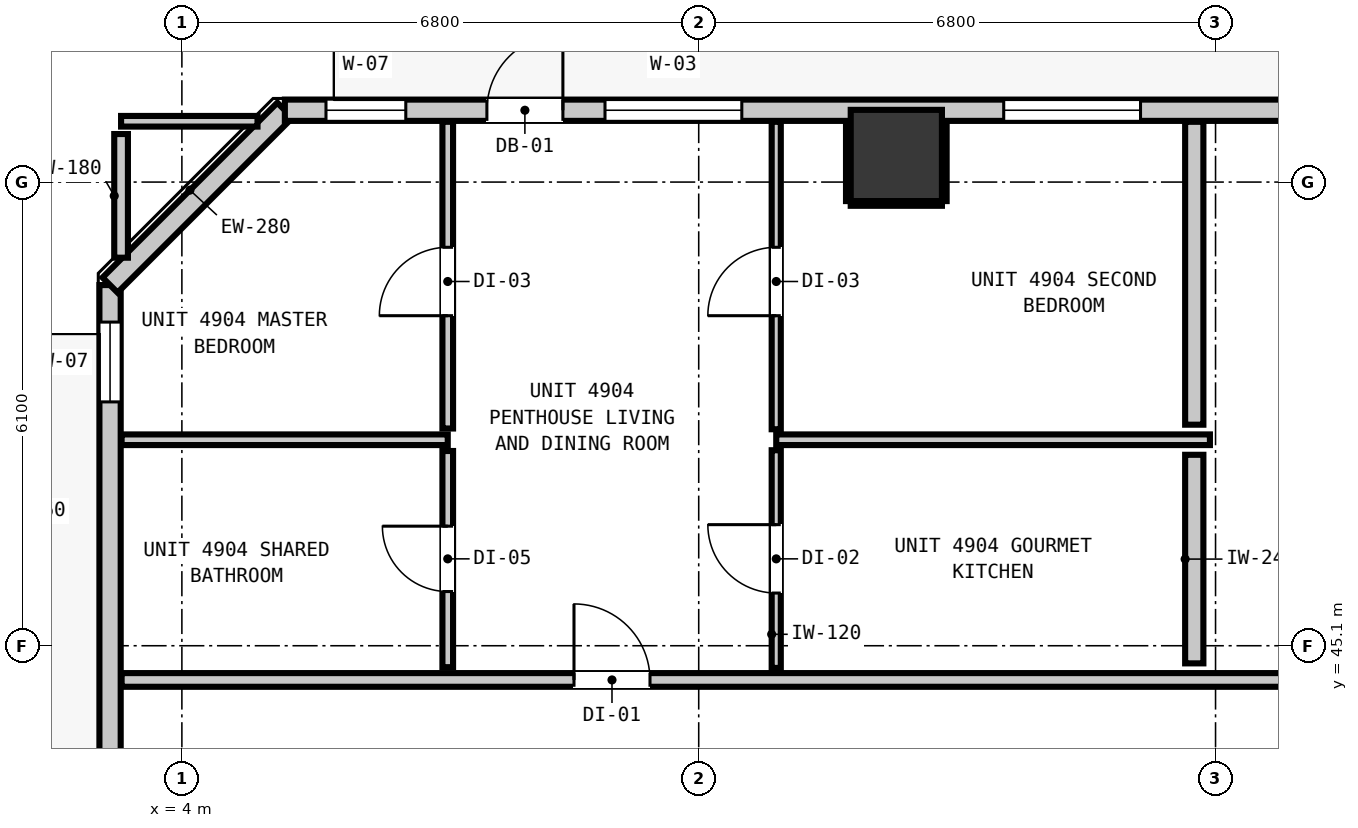
"""IFC4 building model, lengths in metres.
Left out: names, types, materials, properties, quantities, classifications, styles, units other than length and angle.
Written with IfcOpenShell. Run it as: python <this file> out.ifc"""

import sys

from ifc_helpers import new_model, si_unit, direction, frame, frame_2d, origin, origin_2d, place, context, subcontext, project, spatial, rectangle, extrude, element, fill, save


model = new_model("IFC4")
c1 = context("Model", 3, precision=1e-05, world=origin(), true_north=direction((0.0, 1.0)))
c2 = subcontext(c1, "Body", "Model", "MODEL_VIEW")
j1 = project(units=[si_unit("LENGTHUNIT", "METRE"), si_unit("PLANEANGLEUNIT", "RADIAN")], contexts=[c1])
p1 = place(None, origin())
s1 = spatial("IfcSite", under=j1, at=p1, CompositionType="ELEMENT")
p2 = place(p1, origin())
s2 = spatial("IfcBuilding", under=s1, at=p2, CompositionType="ELEMENT")
p3 = place(p2, frame((0.0, 0.0, 169.16)))
s3 = spatial("IfcBuildingStorey", under=s2, at=p3, CompositionType="ELEMENT", Elevation=169.16)
p4 = place(p3, frame((13.4, 51.55, 0.0), z_axis=(0.0, 0.0, 1.0), x_axis=(1.0, 0.0, 0.0)))
e1 = element("IfcColumn", 1, at=p4, inside=s3, PredefinedType="COLUMN", context=c2, shape_type="SweptSolid", body=[
    extrude(rectangle(XDim=1.2, YDim=1.2, at=origin_2d()), origin(), (0.0, 0.0, 1.0), 3.32),
])
p5 = place(p3, frame((3.055, 17.555, 0.0), z_axis=(0.0, 0.0, 1.0), x_axis=(0.0, 1.0, 0.0)))
e2 = element("IfcWall", 2, at=p5, inside=s3, PredefinedType="STANDARD", context=c2, shape_type="SweptSolid", body=[
    extrude(rectangle(XDim=32.29, YDim=0.28, at=frame_2d((16.145, 0.0))), origin(), (0.0, 0.0, 1.0), 2.96),
])
p6 = place(p5, frame((6.871, 0.0, 0.0)))
e3 = element("IfcOpeningElement", 3, at=p6, cuts=e2, PredefinedType="OPENING", context=c2, shape_type="SweptSolid", body=[
    extrude(rectangle(XDim=1.0, YDim=2.15, at=frame_2d((0.5, 1.075))), frame((0.0, 0.15, 0.0), z_axis=(0.0, -1.0, 0.0), x_axis=(1.0, 0.0, 0.0)), (0.0, 0.0, 1.0), 0.3),
])
p7 = place(p5, frame((30.753, 0.0, 0.85)))
e4 = element("IfcOpeningElement", 4, at=p7, cuts=e2, PredefinedType="OPENING", context=c2, shape_type="SweptSolid", body=[
    extrude(rectangle(XDim=1.05, YDim=1.65, at=frame_2d((0.525, 0.825))), frame((0.0, 0.15, 0.0), z_axis=(0.0, -1.0, 0.0), x_axis=(1.0, 0.0, 0.0)), (0.0, 0.0, 1.0), 0.3),
])
p8 = place(p5, frame((8.6, 0.0, 0.85)))
e5 = element("IfcOpeningElement", 5, at=p8, cuts=e2, PredefinedType="OPENING", context=c2, shape_type="SweptSolid", body=[
    extrude(rectangle(XDim=1.05, YDim=1.65, at=frame_2d((0.525, 0.825))), frame((0.0, 0.15, 0.0), z_axis=(0.0, -1.0, 0.0), x_axis=(1.0, 0.0, 0.0)), (0.0, 0.0, 1.0), 0.3),
])
p9 = place(p5, frame((10.612, 0.0, 0.85)))
e6 = element("IfcOpeningElement", 6, at=p9, cuts=e2, PredefinedType="OPENING", context=c2, shape_type="SweptSolid", body=[
    extrude(rectangle(XDim=1.8, YDim=1.9, at=frame_2d((0.9, 0.95))), frame((0.0, 0.15, 0.0), z_axis=(0.0, -1.0, 0.0), x_axis=(1.0, 0.0, 0.0)), (0.0, 0.0, 1.0), 0.3),
])
p10 = place(p5, frame((16.925, 0.0, 0.85)))
e7 = element("IfcOpeningElement", 7, at=p10, cuts=e2, PredefinedType="OPENING", context=c2, shape_type="SweptSolid", body=[
    extrude(rectangle(XDim=1.8, YDim=1.9, at=frame_2d((0.9, 0.95))), frame((0.0, 0.15, 0.0), z_axis=(0.0, -1.0, 0.0), x_axis=(1.0, 0.0, 0.0)), (0.0, 0.0, 1.0), 0.3),
])
p11 = place(p5, frame((20.113, 0.0, 0.85)))
e8 = element("IfcOpeningElement", 8, at=p11, cuts=e2, PredefinedType="OPENING", context=c2, shape_type="SweptSolid", body=[
    extrude(rectangle(XDim=1.05, YDim=1.65, at=frame_2d((0.525, 0.825))), frame((0.0, 0.15, 0.0), z_axis=(0.0, -1.0, 0.0), x_axis=(1.0, 0.0, 0.0)), (0.0, 0.0, 1.0), 0.3),
])
p12 = place(p3, frame((3.055, 49.845, 0.0), z_axis=(0.0, 0.0, 1.0), x_axis=(0.707106781187, 0.707106781187, 0.0)))
e9 = element("IfcWall", 9, at=p12, inside=s3, PredefinedType="STANDARD", context=c2, shape_type="SweptSolid", body=[
    extrude(rectangle(XDim=3.253, YDim=0.28, at=frame_2d((1.626, 0.0))), origin(), (0.0, 0.0, 1.0), 2.96),
])
p13 = place(p3, frame((5.355, 52.145, 0.0), z_axis=(0.0, 0.0, 1.0), x_axis=(1.0, 0.0, 0.0)))
e10 = element("IfcWall", 10, at=p13, inside=s3, PredefinedType="STANDARD", context=c2, shape_type="SweptSolid", body=[
    extrude(rectangle(XDim=35.09, YDim=0.28, at=frame_2d((17.545, 0.0))), origin(), (0.0, 0.0, 1.0), 2.96),
])
p14 = place(p13, frame((2.658, 0.0, 0.0)))
e11 = element("IfcOpeningElement", 11, at=p14, cuts=e10, PredefinedType="OPENING", context=c2, shape_type="SweptSolid", body=[
    extrude(rectangle(XDim=1.0, YDim=2.15, at=frame_2d((0.5, 1.075))), frame((0.0, 0.15, 0.0), z_axis=(0.0, -1.0, 0.0), x_axis=(1.0, 0.0, 0.0)), (0.0, 0.0, 1.0), 0.3),
])
p15 = place(p13, frame((4.212, 0.0, 0.85)))
e12 = element("IfcOpeningElement", 12, at=p15, cuts=e10, PredefinedType="OPENING", context=c2, shape_type="SweptSolid", body=[
    extrude(rectangle(XDim=1.8, YDim=1.9, at=frame_2d((0.9, 0.95))), frame((0.0, 0.15, 0.0), z_axis=(0.0, -1.0, 0.0), x_axis=(1.0, 0.0, 0.0)), (0.0, 0.0, 1.0), 0.3),
])
p16 = place(p13, frame((0.541, 0.0, 0.85)))
e13 = element("IfcOpeningElement", 13, at=p16, cuts=e10, PredefinedType="OPENING", context=c2, shape_type="SweptSolid", body=[
    extrude(rectangle(XDim=1.05, YDim=1.65, at=frame_2d((0.525, 0.825))), frame((0.0, 0.15, 0.0), z_axis=(0.0, -1.0, 0.0), x_axis=(1.0, 0.0, 0.0)), (0.0, 0.0, 1.0), 0.3),
])
p17 = place(p13, frame((9.458, 0.0, 0.85)))
e14 = element("IfcOpeningElement", 14, at=p17, cuts=e10, PredefinedType="OPENING", context=c2, shape_type="SweptSolid", body=[
    extrude(rectangle(XDim=1.8, YDim=1.9, at=frame_2d((0.9, 0.95))), frame((0.0, 0.15, 0.0), z_axis=(0.0, -1.0, 0.0), x_axis=(1.0, 0.0, 0.0)), (0.0, 0.0, 1.0), 0.3),
])
p18 = place(p13, frame((18.205, 0.0, 0.85)))
e15 = element("IfcOpeningElement", 15, at=p18, cuts=e10, PredefinedType="OPENING", context=c2, shape_type="SweptSolid", body=[
    extrude(rectangle(XDim=1.8, YDim=1.9, at=frame_2d((0.9, 0.95))), frame((0.0, 0.15, 0.0), z_axis=(0.0, -1.0, 0.0), x_axis=(1.0, 0.0, 0.0)), (0.0, 0.0, 1.0), 0.3),
])
p19 = place(p13, frame((27.634, 0.0, 0.85)))
e16 = element("IfcOpeningElement", 16, at=p19, cuts=e10, PredefinedType="OPENING", context=c2, shape_type="SweptSolid", body=[
    extrude(rectangle(XDim=1.8, YDim=1.9, at=frame_2d((0.9, 0.95))), frame((0.0, 0.15, 0.0), z_axis=(0.0, -1.0, 0.0), x_axis=(1.0, 0.0, 0.0)), (0.0, 0.0, 1.0), 0.3),
])
p20 = place(p3, frame((3.207, 44.65, 0.0), z_axis=(0.0, 0.0, 1.0), x_axis=(1.0, 0.0, 0.0)))
e17 = element("IfcWall", 17, at=p20, inside=s3, PredefinedType="PARTITIONING", context=c2, shape_type="SweptSolid", body=[
    extrude(rectangle(XDim=39.386, YDim=0.18, at=frame_2d((19.693, 0.0))), origin(), (0.0, 0.0, 1.0), 2.96),
])
p21 = place(p20, frame((5.952, 0.0, 0.0)))
e18 = element("IfcOpeningElement", 18, at=p21, cuts=e17, PredefinedType="OPENING", context=c2, shape_type="SweptSolid", body=[
    extrude(rectangle(XDim=1.0, YDim=2.15, at=frame_2d((0.5, 1.075))), frame((0.0, 0.1, 0.0), z_axis=(0.0, -1.0, 0.0), x_axis=(1.0, 0.0, 0.0)), (0.0, 0.0, 1.0), 0.2),
])
p22 = place(p20, frame((18.866, 0.0, 0.0)))
e19 = element("IfcOpeningElement", 19, at=p22, cuts=e17, PredefinedType="OPENING", context=c2, shape_type="SweptSolid", body=[
    extrude(rectangle(XDim=1.0, YDim=2.15, at=frame_2d((0.5, 1.075))), frame((0.0, 0.1, 0.0), z_axis=(0.0, -1.0, 0.0), x_axis=(1.0, 0.0, 0.0)), (0.0, 0.0, 1.0), 0.2),
])
p23 = place(p20, frame((33.508, 0.0, 0.0)))
e20 = element("IfcOpeningElement", 20, at=p23, cuts=e17, PredefinedType="OPENING", context=c2, shape_type="SweptSolid", body=[
    extrude(rectangle(XDim=0.9, YDim=2.1, at=frame_2d((0.45, 1.05))), frame((0.0, 0.1, 0.0), z_axis=(0.0, -1.0, 0.0), x_axis=(1.0, 0.0, 0.0)), (0.0, 0.0, 1.0), 0.2),
])
p24 = place(p3, frame((3.207, 47.81, 0.0), z_axis=(0.0, 0.0, 1.0), x_axis=(1.0, 0.0, 0.0)))
e21 = element("IfcWall", 21, at=p24, inside=s3, PredefinedType="PARTITIONING", context=c2, shape_type="SweptSolid", body=[
    extrude(rectangle(XDim=4.291, YDim=0.14, at=frame_2d((2.146, 0.0))), origin(), (0.0, 0.0, 1.0), 2.96),
])
p25 = place(p3, frame((11.82, 47.81, 0.0), z_axis=(0.0, 0.0, 1.0), x_axis=(1.0, 0.0, 0.0)))
e22 = element("IfcWall", 22, at=p25, inside=s3, PredefinedType="PARTITIONING", context=c2, shape_type="SweptSolid", body=[
    extrude(rectangle(XDim=5.706, YDim=0.14, at=frame_2d((2.853, 0.0))), origin(), (0.0, 0.0, 1.0), 2.96),
])
p26 = place(p3, frame((3.2, 52.0, 0.0), z_axis=(0.0, 0.0, 1.0), x_axis=(1.0, 0.0, 0.0)))
e23 = element("IfcWall", 23, at=p26, inside=s3, PredefinedType="PARTITIONING", context=c2, shape_type="SweptSolid", body=[
    extrude(rectangle(XDim=1.795, YDim=0.14, at=frame_2d((0.897, 0.0))), origin(), (0.0, 0.0, 1.0), 2.96),
])
p27 = place(p3, frame((17.32, 44.868, 0.0), z_axis=(0.0, 0.0, 1.0), x_axis=(0.0, 1.0, 0.0)))
e24 = element("IfcWall", 24, at=p27, inside=s3, PredefinedType="PARTITIONING", context=c2, shape_type="SweptSolid", body=[
    extrude(rectangle(XDim=2.744, YDim=0.24, at=frame_2d((1.372, 0.0))), origin(), (0.0, 0.0, 1.0), 2.96),
])
p28 = place(p3, frame((17.32, 48.008, 0.0), z_axis=(0.0, 0.0, 1.0), x_axis=(0.0, 1.0, 0.0)))
e25 = element("IfcWall", 25, at=p28, inside=s3, PredefinedType="PARTITIONING", context=c2, shape_type="SweptSolid", body=[
    extrude(rectangle(XDim=3.985, YDim=0.24, at=frame_2d((1.992, 0.0))), origin(), (0.0, 0.0, 1.0), 2.96),
])
p29 = place(p3, frame((3.2, 50.205, 0.0), z_axis=(0.0, 0.0, 1.0), x_axis=(0.0, 1.0, 0.0)))
e26 = element("IfcWall", 26, at=p29, inside=s3, PredefinedType="PARTITIONING", context=c2, shape_type="SweptSolid", body=[
    extrude(rectangle(XDim=1.627, YDim=0.18, at=frame_2d((0.813, 0.0))), origin(), (0.0, 0.0, 1.0), 2.96),
])
p30 = place(p3, frame((7.498, 44.818, 0.0), z_axis=(0.0, 0.0, 1.0), x_axis=(0.0, 1.0, 0.0)))
e27 = element("IfcWall", 27, at=p30, inside=s3, PredefinedType="PARTITIONING", context=c2, shape_type="SweptSolid", body=[
    extrude(rectangle(XDim=2.844, YDim=0.14, at=frame_2d((1.422, 0.0))), origin(), (0.0, 0.0, 1.0), 2.96),
])
p31 = place(p30, frame((0.995, 0.0, 0.0)))
e28 = element("IfcOpeningElement", 28, at=p31, cuts=e27, PredefinedType="OPENING", context=c2, shape_type="SweptSolid", body=[
    extrude(rectangle(XDim=0.86, YDim=2.02, at=frame_2d((0.43, 1.01))), frame((0.0, 0.08, 0.0), z_axis=(0.0, -1.0, 0.0), x_axis=(1.0, 0.0, 0.0)), (0.0, 0.0, 1.0), 0.16),
])
p32 = place(p3, frame((7.498, 47.958, 0.0), z_axis=(0.0, 0.0, 1.0), x_axis=(0.0, 1.0, 0.0)))
e29 = element("IfcWall", 29, at=p32, inside=s3, PredefinedType="PARTITIONING", context=c2, shape_type="SweptSolid", body=[
    extrude(rectangle(XDim=4.035, YDim=0.14, at=frame_2d((2.018, 0.0))), origin(), (0.0, 0.0, 1.0), 2.96),
])
p33 = place(p32, frame((1.484, 0.0, 0.0)))
e30 = element("IfcOpeningElement", 30, at=p33, cuts=e29, PredefinedType="OPENING", context=c2, shape_type="SweptSolid", body=[
    extrude(rectangle(XDim=0.9, YDim=2.1, at=frame_2d((0.45, 1.05))), frame((0.0, 0.08, 0.0), z_axis=(0.0, -1.0, 0.0), x_axis=(1.0, 0.0, 0.0)), (0.0, 0.0, 1.0), 0.16),
])
p34 = place(p3, frame((11.82, 44.808, 0.0), z_axis=(0.0, 0.0, 1.0), x_axis=(0.0, 1.0, 0.0)))
e31 = element("IfcWall", 31, at=p34, inside=s3, PredefinedType="PARTITIONING", context=c2, shape_type="SweptSolid", body=[
    extrude(rectangle(XDim=2.864, YDim=0.12, at=frame_2d((1.432, 0.0))), origin(), (0.0, 0.0, 1.0), 2.96),
])
p35 = place(p34, frame((0.985, 0.0, 0.0)))
e32 = element("IfcOpeningElement", 32, at=p35, cuts=e31, PredefinedType="OPENING", context=c2, shape_type="SweptSolid", body=[
    extrude(rectangle(XDim=0.9, YDim=2.1, at=frame_2d((0.45, 1.05))), frame((0.0, 0.07, 0.0), z_axis=(0.0, -1.0, 0.0), x_axis=(1.0, 0.0, 0.0)), (0.0, 0.0, 1.0), 0.14),
])
p36 = place(p3, frame((11.82, 47.948, 0.0), z_axis=(0.0, 0.0, 1.0), x_axis=(0.0, 1.0, 0.0)))
e33 = element("IfcWall", 33, at=p36, inside=s3, PredefinedType="PARTITIONING", context=c2, shape_type="SweptSolid", body=[
    extrude(rectangle(XDim=4.045, YDim=0.12, at=frame_2d((2.022, 0.0))), origin(), (0.0, 0.0, 1.0), 2.96),
])
p37 = place(p36, frame((1.494, 0.0, 0.0)))
e34 = element("IfcOpeningElement", 34, at=p37, cuts=e33, PredefinedType="OPENING", context=c2, shape_type="SweptSolid", body=[
    extrude(rectangle(XDim=0.9, YDim=2.1, at=frame_2d((0.45, 1.05))), frame((0.0, 0.07, 0.0), z_axis=(0.0, -1.0, 0.0), x_axis=(1.0, 0.0, 0.0)), (0.0, 0.0, 1.0), 0.14),
])
p38 = place(p3, frame((12.8, 50.918, 0.0), z_axis=(0.0, 0.0, 1.0), x_axis=(1.0, 0.0, 0.0)))
e35 = element("IfcWall", 35, at=p38, inside=s3, PredefinedType="PARTITIONING", context=c2, shape_type="SweptSolid", body=[
    extrude(rectangle(XDim=1.2, YDim=0.06, at=frame_2d((0.6, 0.0))), origin(), (0.0, 0.0, 1.0), 1.45),
])
for number, where, z_axis, x_axis in (
    (36, (12.768, 50.95, 0.0), (0.0, 0.0, 1.0), (0.0, 1.0, 0.0)),
    (37, (14.032, 50.95, 0.0), (0.0, 0.0, 1.0), (0.0, 1.0, 0.0)),
):
    element("IfcWall", number, at=place(p3, frame(where, z_axis=z_axis, x_axis=x_axis)), inside=s3, PredefinedType="PARTITIONING", context=c2, shape_type="SweptSolid", body=[
        extrude(rectangle(XDim=1.04, YDim=0.06, at=frame_2d((0.52, 0.0))), origin(), (0.0, 0.0, 1.0), 1.45),
    ])
p39 = place(p14, origin())
e38 = element("IfcDoor", 38, at=p39, inside=s3, OperationType="SINGLE_SWING_RIGHT", PredefinedType="DOOR", context=c2, shape_type="SweptSolid", body=[
    extrude(rectangle(XDim=1.0, YDim=2.15, at=frame_2d((0.5, 1.075))), frame((0.0, 0.025, 0.0), z_axis=(0.0, -1.0, 0.0), x_axis=(1.0, 0.0, 0.0)), (0.0, 0.0, 1.0), 0.05),
])
fill(e11, e38)
p40 = place(p7, origin())
e39 = element("IfcWindow", 39, at=p40, inside=s3, PartitioningType="SINGLE_PANEL", PredefinedType="WINDOW", context=c2, shape_type="SweptSolid", body=[
    extrude(rectangle(XDim=1.05, YDim=1.65, at=frame_2d((0.525, 0.825))), frame((0.0, 0.03, 0.0), z_axis=(0.0, -1.0, 0.0), x_axis=(1.0, 0.0, 0.0)), (0.0, 0.0, 1.0), 0.06),
])
fill(e4, e39)
p41 = place(p15, origin())
e40 = element("IfcWindow", 40, at=p41, inside=s3, PartitioningType="SINGLE_PANEL", PredefinedType="WINDOW", context=c2, shape_type="SweptSolid", body=[
    extrude(rectangle(XDim=1.8, YDim=1.9, at=frame_2d((0.9, 0.95))), frame((0.0, 0.03, 0.0), z_axis=(0.0, -1.0, 0.0), x_axis=(1.0, 0.0, 0.0)), (0.0, 0.0, 1.0), 0.06),
])
fill(e12, e40)
p42 = place(p16, origin())
e41 = element("IfcWindow", 41, at=p42, inside=s3, PartitioningType="SINGLE_PANEL", PredefinedType="WINDOW", context=c2, shape_type="SweptSolid", body=[
    extrude(rectangle(XDim=1.05, YDim=1.65, at=frame_2d((0.525, 0.825))), frame((0.0, 0.03, 0.0), z_axis=(0.0, -1.0, 0.0), x_axis=(1.0, 0.0, 0.0)), (0.0, 0.0, 1.0), 0.06),
])
fill(e13, e41)
p43 = place(p17, origin())
e42 = element("IfcWindow", 42, at=p43, inside=s3, PartitioningType="SINGLE_PANEL", PredefinedType="WINDOW", context=c2, shape_type="SweptSolid", body=[
    extrude(rectangle(XDim=1.8, YDim=1.9, at=frame_2d((0.9, 0.95))), frame((0.0, 0.03, 0.0), z_axis=(0.0, -1.0, 0.0), x_axis=(1.0, 0.0, 0.0)), (0.0, 0.0, 1.0), 0.06),
])
fill(e14, e42)
p44 = place(p21, origin())
e43 = element("IfcDoor", 43, at=p44, inside=s3, OperationType="SINGLE_SWING_LEFT", PredefinedType="DOOR", context=c2, shape_type="SweptSolid", body=[
    extrude(rectangle(XDim=1.0, YDim=2.15, at=frame_2d((0.5, 1.075))), frame((0.0, 0.025, 0.0), z_axis=(0.0, -1.0, 0.0), x_axis=(1.0, 0.0, 0.0)), (0.0, 0.0, 1.0), 0.05),
])
fill(e18, e43)
p45 = place(p31, origin())
e44 = element("IfcDoor", 44, at=p45, inside=s3, OperationType="SINGLE_SWING_RIGHT", PredefinedType="DOOR", context=c2, shape_type="SweptSolid", body=[
    extrude(rectangle(XDim=0.86, YDim=2.02, at=frame_2d((0.43, 1.01))), frame((0.0, 0.025, 0.0), z_axis=(0.0, -1.0, 0.0), x_axis=(1.0, 0.0, 0.0)), (0.0, 0.0, 1.0), 0.05),
])
fill(e28, e44)
p46 = place(p33, origin())
e45 = element("IfcDoor", 45, at=p46, inside=s3, OperationType="SINGLE_SWING_LEFT", PredefinedType="DOOR", context=c2, shape_type="SweptSolid", body=[
    extrude(rectangle(XDim=0.9, YDim=2.1, at=frame_2d((0.45, 1.05))), frame((0.0, 0.025, 0.0), z_axis=(0.0, -1.0, 0.0), x_axis=(1.0, 0.0, 0.0)), (0.0, 0.0, 1.0), 0.05),
])
fill(e30, e45)
p47 = place(p35, origin())
e46 = element("IfcDoor", 46, at=p47, inside=s3, OperationType="SINGLE_SWING_RIGHT", PredefinedType="DOOR", context=c2, shape_type="SweptSolid", body=[
    extrude(rectangle(XDim=0.9, YDim=2.1, at=frame_2d((0.45, 1.05))), frame((0.0, 0.025, 0.0), z_axis=(0.0, -1.0, 0.0), x_axis=(1.0, 0.0, 0.0)), (0.0, 0.0, 1.0), 0.05),
])
fill(e32, e46)
p48 = place(p37, origin())
e47 = element("IfcDoor", 47, at=p48, inside=s3, OperationType="SINGLE_SWING_LEFT", PredefinedType="DOOR", context=c2, shape_type="SweptSolid", body=[
    extrude(rectangle(XDim=0.9, YDim=2.1, at=frame_2d((0.45, 1.05))), frame((0.0, 0.025, 0.0), z_axis=(0.0, -1.0, 0.0), x_axis=(1.0, 0.0, 0.0)), (0.0, 0.0, 1.0), 0.05),
])
fill(e34, e47)
save(model, sys.argv[1])
